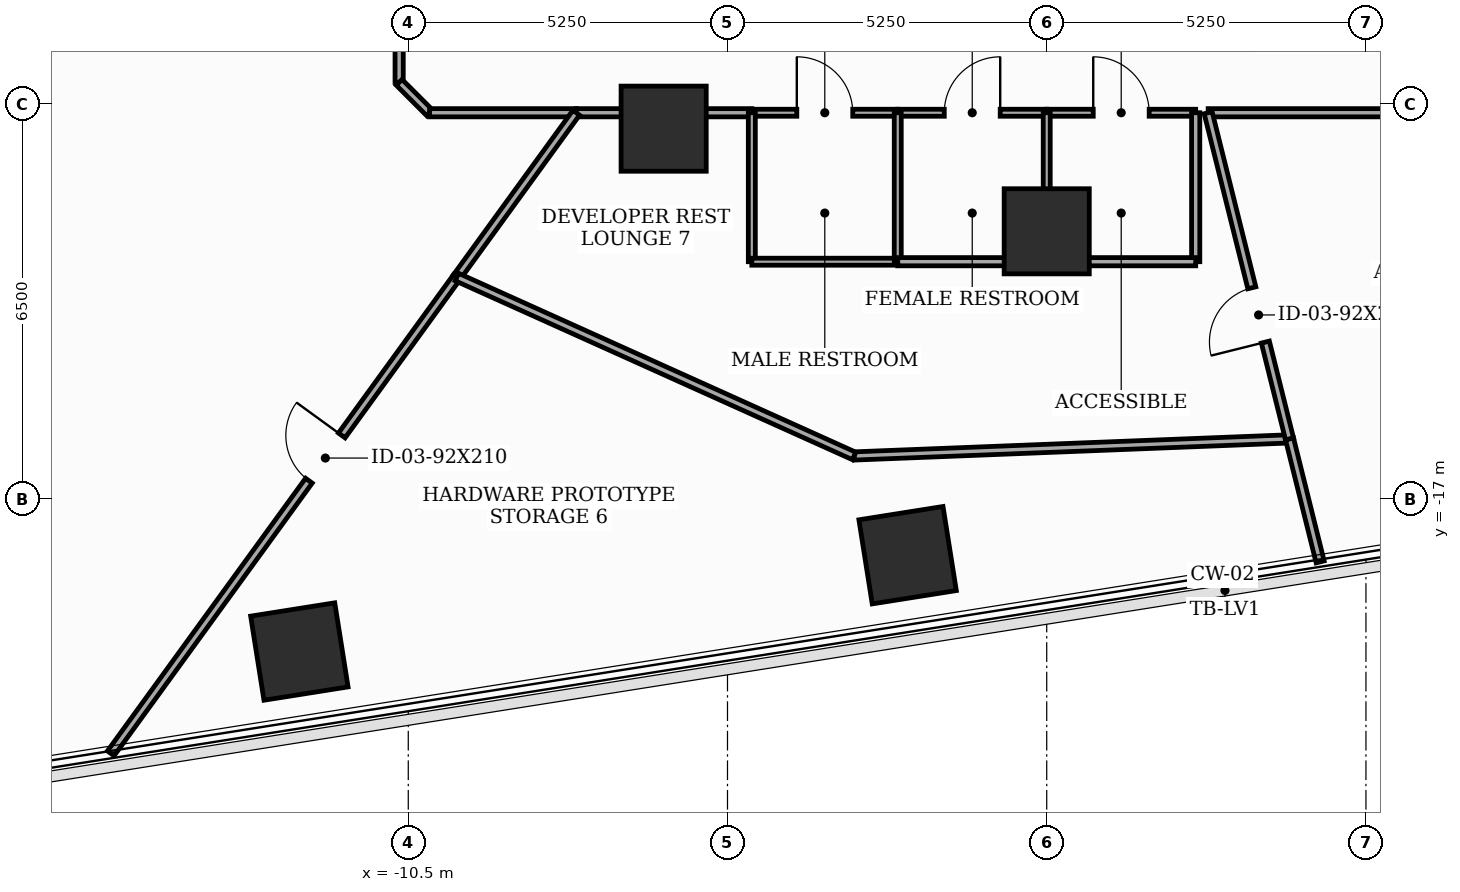
"""IFC4 building model, lengths in metres.
Left out: names, types, materials, properties, quantities, classifications, styles, units other than length and angle.
Written with IfcOpenShell. Run it as: python <this file> out.ifc"""

import sys

from ifc_helpers import new_model, si_unit, direction, frame, frame_2d, origin, origin_2d, place, context, subcontext, project, spatial, rectangle, extrude, element, fill, save


model = new_model("IFC4")
c1 = context("Model", 3, precision=1e-05, world=origin(), true_north=direction((0.0, 1.0)))
c2 = subcontext(c1, "Body", "Model", "MODEL_VIEW")
j1 = project(units=[si_unit("LENGTHUNIT", "METRE"), si_unit("PLANEANGLEUNIT", "RADIAN")], contexts=[c1])
p1 = place(None, origin())
s1 = spatial("IfcSite", under=j1, at=p1, CompositionType="ELEMENT")
p2 = place(p1, origin())
s2 = spatial("IfcBuilding", under=s1, at=p2, CompositionType="ELEMENT")
p3 = place(p2, frame((0.0, 0.0, 55.6)))
s3 = spatial("IfcBuildingStorey", under=s2, at=p3, CompositionType="ELEMENT", Elevation=55.6)
for number, where, z_axis, x_axis in (
    (1, (-6.3, -10.912, 0.0), (0.0, 0.0, 1.0), (1.0, 0.0, 0.0)),
    (2, (0.0, -12.6, 0.0), (0.0, 0.0, 1.0), (1.0, 0.0, 0.0)),
    (3, (-12.291, -19.511, 0.0), (0.0, 0.0, 1.0), (0.988, 0.156, 0.0)),
    (4, (-2.288, -17.927, 0.0), (0.0, 0.0, 1.0), (0.988, 0.156, 0.0)),
):
    element("IfcColumn", number, at=place(p3, frame(where, z_axis=z_axis, x_axis=x_axis)), inside=s3, PredefinedType="COLUMN", context=c2, shape_type="SweptSolid", body=[
        extrude(rectangle(XDim=1.4, YDim=1.4, at=origin_2d()), origin(), (0.0, 0.0, 1.0), 3.7),
    ])
p4 = place(p3, frame((-10.65, -3.992, 0.0), z_axis=(0.0, 0.0, 1.0), x_axis=(0.0, -1.0, 0.0)))
e5 = element("IfcWall", 5, at=p4, inside=s3, PredefinedType="PARTITIONING", context=c2, shape_type="SweptSolid", body=[
    extrude(rectangle(XDim=6.158, YDim=0.135, at=frame_2d((3.079, 0.0))), origin(), (0.0, 0.0, 1.0), 2.785),
])
p5 = place(p3, frame((-10.65, -10.15, 0.0), z_axis=(0.0, 0.0, 1.0), x_axis=(0.707106781187, -0.707106781187, 0.0)))
e6 = element("IfcWall", 6, at=p5, inside=s3, PredefinedType="PARTITIONING", context=c2, shape_type="SweptSolid", body=[
    extrude(rectangle(XDim=0.707, YDim=0.135, at=frame_2d((0.354, 0.0))), origin(), (0.0, 0.0, 1.0), 3.5),
])
p6 = place(p3, frame((-10.15, -10.65, 0.0), z_axis=(0.0, 0.0, 1.0), x_axis=(1.0, 0.0, 0.0)))
e7 = element("IfcWall", 7, at=p6, inside=s3, PredefinedType="PARTITIONING", context=c2, shape_type="SweptSolid", body=[
    extrude(rectangle(XDim=2.412, YDim=0.135, at=frame_2d((1.206, 0.0))), origin(), (0.0, 0.0, 1.0), 3.5),
])
p7 = place(p3, frame((-4.85, -10.65, 0.0), z_axis=(0.0, 0.0, 1.0), x_axis=(1.0, 0.0, 0.0)))
e8 = element("IfcWall", 8, at=p7, inside=s3, PredefinedType="PARTITIONING", context=c2, shape_type="SweptSolid", body=[
    extrude(rectangle(XDim=2.4, YDim=0.115, at=frame_2d((1.2, 0.0))), origin(), (0.0, 0.0, 1.0), 3.5),
])
p8 = place(p7, frame((0.74, 0.0, 0.0)))
e9 = element("IfcOpeningElement", 9, at=p8, cuts=e8, PredefinedType="OPENING", context=c2, shape_type="SweptSolid", body=[
    extrude(rectangle(XDim=0.92, YDim=2.1, at=frame_2d((0.46, 1.05))), frame((0.0, 0.067, 0.0), z_axis=(0.0, -1.0, 0.0), x_axis=(1.0, 0.0, 0.0)), (0.0, 0.0, 1.0), 0.135),
])
p9 = place(p3, frame((-7.738, -10.65, 0.0), z_axis=(0.0, 0.0, 1.0), x_axis=(1.0, 0.0, 0.0)))
e10 = element("IfcWall", 10, at=p9, inside=s3, PredefinedType="PARTITIONING", context=c2, shape_type="SweptSolid", body=[
    extrude(rectangle(XDim=2.888, YDim=0.135, at=frame_2d((1.444, 0.0))), origin(), (0.0, 0.0, 1.0), 2.785),
])
p10 = place(p3, frame((-2.45, -10.65, 0.0), z_axis=(0.0, 0.0, 1.0), x_axis=(1.0, 0.0, 0.0)))
e11 = element("IfcWall", 11, at=p10, inside=s3, PredefinedType="PARTITIONING", context=c2, shape_type="SweptSolid", body=[
    extrude(rectangle(XDim=2.45, YDim=0.115, at=frame_2d((1.225, 0.0))), origin(), (0.0, 0.0, 1.0), 2.785),
])
p11 = place(p10, frame((0.765, 0.0, 0.0)))
e12 = element("IfcOpeningElement", 12, at=p11, cuts=e11, PredefinedType="OPENING", context=c2, shape_type="SweptSolid", body=[
    extrude(rectangle(XDim=0.92, YDim=2.1, at=frame_2d((0.46, 1.05))), frame((0.0, 0.067, 0.0), z_axis=(0.0, -1.0, 0.0), x_axis=(1.0, 0.0, 0.0)), (0.0, 0.0, 1.0), 0.135),
])
p12 = place(p3, frame((0.0, -10.65, 0.0), z_axis=(0.0, 0.0, 1.0), x_axis=(1.0, 0.0, 0.0)))
e13 = element("IfcWall", 13, at=p12, inside=s3, PredefinedType="PARTITIONING", context=c2, shape_type="SweptSolid", body=[
    extrude(rectangle(XDim=2.45, YDim=0.115, at=frame_2d((1.225, 0.0))), origin(), (0.0, 0.0, 1.0), 3.5),
])
p13 = place(p12, frame((0.765, 0.0, 0.0)))
e14 = element("IfcOpeningElement", 14, at=p13, cuts=e13, PredefinedType="OPENING", context=c2, shape_type="SweptSolid", body=[
    extrude(rectangle(XDim=0.92, YDim=2.1, at=frame_2d((0.46, 1.05))), frame((0.0, 0.067, 0.0), z_axis=(0.0, -1.0, 0.0), x_axis=(1.0, 0.0, 0.0)), (0.0, 0.0, 1.0), 0.135),
])
p14 = place(p3, frame((2.655, -10.65, 0.0), z_axis=(0.0, 0.0, 1.0), x_axis=(1.0, 0.0, 0.0)))
e15 = element("IfcWall", 15, at=p14, inside=s3, PredefinedType="PARTITIONING", context=c2, shape_type="SweptSolid", body=[
    extrude(rectangle(XDim=7.495, YDim=0.135, at=frame_2d((3.748, 0.0))), origin(), (0.0, 0.0, 1.0), 2.785),
])
p15 = place(p3, frame((-15.393, -21.187, 0.0), z_axis=(0.0, 0.0, 1.0), x_axis=(0.587736917223, 0.809052109653, 0.0)))
e16 = element("IfcWall", 16, at=p15, inside=s3, PredefinedType="PARTITIONING", context=c2, shape_type="SweptSolid", body=[
    extrude(rectangle(XDim=9.684, YDim=0.135, at=frame_2d((4.842, 0.0))), origin(), (0.0, 0.0, 1.0), 2.935),
])
p16 = place(p15, frame((5.544, 0.0, 0.0)))
e17 = element("IfcOpeningElement", 17, at=p16, cuts=e16, PredefinedType="OPENING", context=c2, shape_type="SweptSolid", body=[
    extrude(rectangle(XDim=0.92, YDim=2.1, at=frame_2d((0.46, 1.05))), frame((0.0, 0.077, 0.0), z_axis=(0.0, -1.0, 0.0), x_axis=(1.0, 0.0, 0.0)), (0.0, 0.0, 1.0), 0.155),
])
p17 = place(p3, frame((-9.701, -13.352, 0.0), z_axis=(0.0, 0.0, 1.0), x_axis=(0.587719574609, 0.809064707932, 0.0)))
e18 = element("IfcWall", 18, at=p17, inside=s3, PredefinedType="PARTITIONING", context=c2, shape_type="SweptSolid", body=[
    extrude(rectangle(XDim=3.34, YDim=0.135, at=frame_2d((1.67, 0.0))), origin(), (0.0, 0.0, 1.0), 3.5),
])
p18 = place(p3, frame((3.993, -16.014, 0.0), z_axis=(0.0, 0.0, 1.0), x_axis=(-0.999230720769, -0.039216918185, 0.0)))
e19 = element("IfcWall", 19, at=p18, inside=s3, PredefinedType="PARTITIONING", context=c2, shape_type="SweptSolid", body=[
    extrude(rectangle(XDim=7.166, YDim=0.135, at=frame_2d((3.583, 0.0))), origin(), (0.0, 0.0, 1.0), 2.785),
])
p19 = place(p3, frame((-3.167, -16.295, 0.0), z_axis=(0.0, 0.0, 1.0), x_axis=(-0.911785675506, 0.410666387645, 0.0)))
e20 = element("IfcWall", 20, at=p19, inside=s3, PredefinedType="PARTITIONING", context=c2, shape_type="SweptSolid", body=[
    extrude(rectangle(XDim=7.166, YDim=0.135, at=frame_2d((3.583, 0.0))), origin(), (0.0, 0.0, 1.0), 2.785),
])
p20 = place(p3, frame((4.497, -18.037, 0.0), z_axis=(0.0, 0.0, 1.0), x_axis=(-0.24157117672, 0.970383102995, 0.0)))
e21 = element("IfcWall", 21, at=p20, inside=s3, PredefinedType="PARTITIONING", context=c2, shape_type="SweptSolid", body=[
    extrude(rectangle(XDim=2.085, YDim=0.135, at=frame_2d((1.042, 0.0))), origin(), (0.0, 0.0, 1.0), 2.935),
])
p21 = place(p3, frame((-4.85, -10.65, 0.0), z_axis=(0.0, 0.0, 1.0), x_axis=(0.0, -1.0, 0.0)))
e22 = element("IfcWall", 22, at=p21, inside=s3, PredefinedType="PARTITIONING", context=c2, shape_type="SweptSolid", body=[
    extrude(rectangle(XDim=2.45, YDim=0.115, at=frame_2d((1.225, 0.0))), origin(), (0.0, 0.0, 1.0), 2.785),
])
p22 = place(p3, frame((-4.85, -13.1, 0.0), z_axis=(0.0, 0.0, 1.0), x_axis=(1.0, 0.0, 0.0)))
e23 = element("IfcWall", 23, at=p22, inside=s3, PredefinedType="PARTITIONING", context=c2, shape_type="SweptSolid", body=[
    extrude(rectangle(XDim=2.4, YDim=0.115, at=frame_2d((1.2, 0.0))), origin(), (0.0, 0.0, 1.0), 3.5),
])
p23 = place(p3, frame((-2.45, -13.1, 0.0), z_axis=(0.0, 0.0, 1.0), x_axis=(0.0, 1.0, 0.0)))
e24 = element("IfcWall", 24, at=p23, inside=s3, PredefinedType="PARTITIONING", context=c2, shape_type="SweptSolid", body=[
    extrude(rectangle(XDim=2.45, YDim=0.115, at=frame_2d((1.225, 0.0))), origin(), (0.0, 0.0, 1.0), 2.785),
])
p24 = place(p3, frame((0.0, -13.1, 0.0), z_axis=(0.0, 0.0, 1.0), x_axis=(-1.0, 0.0, 0.0)))
e25 = element("IfcWall", 25, at=p24, inside=s3, PredefinedType="PARTITIONING", context=c2, shape_type="SweptSolid", body=[
    extrude(rectangle(XDim=2.45, YDim=0.135, at=frame_2d((1.225, 0.0))), origin(), (0.0, 0.0, 1.0), 2.785),
])
p25 = place(p3, frame((2.45, -10.65, 0.0), z_axis=(0.0, 0.0, 1.0), x_axis=(0.0, -1.0, 0.0)))
e26 = element("IfcWall", 26, at=p25, inside=s3, PredefinedType="PARTITIONING", context=c2, shape_type="SweptSolid", body=[
    extrude(rectangle(XDim=2.45, YDim=0.135, at=frame_2d((1.225, 0.0))), origin(), (0.0, 0.0, 1.0), 2.785),
])
p26 = place(p3, frame((2.45, -13.1, 0.0), z_axis=(0.0, 0.0, 1.0), x_axis=(-1.0, 0.0, 0.0)))
e27 = element("IfcWall", 27, at=p26, inside=s3, PredefinedType="PARTITIONING", context=c2, shape_type="SweptSolid", body=[
    extrude(rectangle(XDim=2.45, YDim=0.135, at=frame_2d((1.225, 0.0))), origin(), (0.0, 0.0, 1.0), 2.785),
])
p27 = place(p3, frame((3.993, -16.014, 0.0), z_axis=(0.0, 0.0, 1.0), x_axis=(-0.242005649473, 0.97027484025, 0.0)))
e28 = element("IfcWall", 28, at=p27, inside=s3, PredefinedType="PARTITIONING", context=c2, shape_type="SweptSolid", body=[
    extrude(rectangle(XDim=5.528, YDim=0.135, at=frame_2d((2.764, 0.0))), origin(), (0.0, 0.0, 1.0), 2.785),
])
p28 = place(p27, frame((1.641, 0.0, 0.0)))
e29 = element("IfcOpeningElement", 29, at=p28, cuts=e28, PredefinedType="OPENING", context=c2, shape_type="SweptSolid", body=[
    extrude(rectangle(XDim=0.92, YDim=2.1, at=frame_2d((0.46, 1.05))), frame((0.0, 0.077, 0.0), z_axis=(0.0, -1.0, 0.0), x_axis=(1.0, 0.0, 0.0)), (0.0, 0.0, 1.0), 0.155),
])
p29 = place(p3, frame((0.0, -13.1, 0.0), z_axis=(0.0, 0.0, 1.0), x_axis=(0.0, 1.0, 0.0)))
e30 = element("IfcWall", 30, at=p29, inside=s3, PredefinedType="PARTITIONING", context=c2, shape_type="SweptSolid", body=[
    extrude(rectangle(XDim=2.45, YDim=0.115, at=frame_2d((1.225, 0.0))), origin(), (0.0, 0.0, 1.0), 2.785),
])
p30 = place(p8, origin())
e31 = element("IfcDoor", 31, at=p30, inside=s3, OperationType="SINGLE_SWING_LEFT", PredefinedType="DOOR", context=c2, shape_type="SweptSolid", body=[
    extrude(rectangle(XDim=0.92, YDim=2.1, at=frame_2d((0.46, 1.05))), frame((0.0, 0.025, 0.0), z_axis=(0.0, -1.0, 0.0), x_axis=(1.0, 0.0, 0.0)), (0.0, 0.0, 1.0), 0.05),
])
fill(e9, e31)
p31 = place(p11, origin())
e32 = element("IfcDoor", 32, at=p31, inside=s3, OperationType="SINGLE_SWING_RIGHT", PredefinedType="DOOR", context=c2, shape_type="SweptSolid", body=[
    extrude(rectangle(XDim=0.92, YDim=2.1, at=frame_2d((0.46, 1.05))), frame((0.0, 0.025, 0.0), z_axis=(0.0, -1.0, 0.0), x_axis=(1.0, 0.0, 0.0)), (0.0, 0.0, 1.0), 0.05),
])
fill(e12, e32)
p32 = place(p13, origin())
e33 = element("IfcDoor", 33, at=p32, inside=s3, OperationType="SINGLE_SWING_LEFT", PredefinedType="DOOR", context=c2, shape_type="SweptSolid", body=[
    extrude(rectangle(XDim=0.92, YDim=2.1, at=frame_2d((0.46, 1.05))), frame((0.0, 0.025, 0.0), z_axis=(0.0, -1.0, 0.0), x_axis=(1.0, 0.0, 0.0)), (0.0, 0.0, 1.0), 0.05),
])
fill(e14, e33)
p33 = place(p16, origin())
e34 = element("IfcDoor", 34, at=p33, inside=s3, OperationType="SINGLE_SWING_RIGHT", PredefinedType="DOOR", context=c2, shape_type="SweptSolid", body=[
    extrude(rectangle(XDim=0.92, YDim=2.1, at=frame_2d((0.46, 1.05))), frame((0.0, 0.025, 0.0), z_axis=(0.0, -1.0, 0.0), x_axis=(1.0, 0.0, 0.0)), (0.0, 0.0, 1.0), 0.05),
])
fill(e17, e34)
p34 = place(p28, origin())
e35 = element("IfcDoor", 35, at=p34, inside=s3, OperationType="SINGLE_SWING_LEFT", PredefinedType="DOOR", context=c2, shape_type="SweptSolid", body=[
    extrude(rectangle(XDim=0.92, YDim=2.1, at=frame_2d((0.46, 1.05))), frame((0.0, 0.025, 0.0), z_axis=(0.0, -1.0, 0.0), x_axis=(1.0, 0.0, 0.0)), (0.0, 0.0, 1.0), 0.05),
])
fill(e29, e35)
save(model, sys.argv[1])
